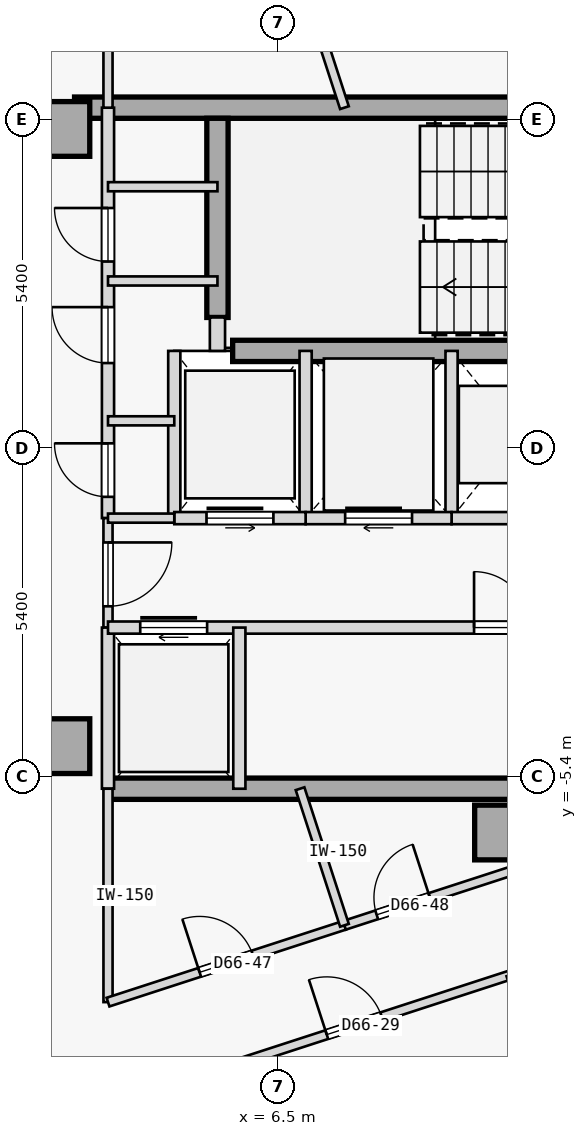
"""IFC4 building model, lengths in metres.
Left out: names, types, materials, properties, quantities, classifications, styles, units other than length and angle.
Written with IfcOpenShell. Run it as: python <this file> out.ifc"""

import sys

from ifc_helpers import new_model, si_unit, direction, frame, frame_2d, origin, origin_2d, place, context, subcontext, project, spatial, rectangle, extrude, element, fill, save


model = new_model("IFC4")
c1 = context("Model", 3, precision=1e-05, world=origin(), true_north=direction((0.0, 1.0)))
c2 = subcontext(c1, "Body", "Model", "MODEL_VIEW")
j1 = project(units=[si_unit("LENGTHUNIT", "METRE"), si_unit("PLANEANGLEUNIT", "RADIAN")], contexts=[c1])
p1 = place(None, origin())
s1 = spatial("IfcSite", under=j1, at=p1, CompositionType="ELEMENT")
p2 = place(p1, origin())
s2 = spatial("IfcBuilding", under=s1, at=p2, CompositionType="ELEMENT")
p3 = place(p2, frame((0.0, 0.0, 247.75)))
s3 = spatial("IfcBuildingStorey", under=s2, at=p3, CompositionType="ELEMENT", Elevation=247.75)
for number, where, z_axis, x_axis in (
    (1, (10.18, -6.32, 0.0), (0.0, 0.0, 1.0), (1.0, 0.0, 0.0)),
    (2, (2.95, -4.9, 0.0), (0.0, 0.0, 1.0), (1.0, 0.0, 0.0)),
    (3, (2.95, 5.25, 0.0), (0.0, 0.0, 1.0), (1.0, 0.0, 0.0)),
):
    element("IfcColumn", number, at=place(p3, frame(where, z_axis=z_axis, x_axis=x_axis)), inside=s3, PredefinedType="COLUMN", context=c2, shape_type="SweptSolid", body=[
        extrude(rectangle(XDim=0.9, YDim=0.9, at=origin_2d()), origin(), (0.0, 0.0, 1.0), 3.35),
    ])
p4 = place(p3, frame((3.15, 5.6, 0.0), z_axis=(0.0, 0.0, 1.0), x_axis=(1.0, 0.0, 0.0)))
e4 = element("IfcWall", 4, at=p4, inside=s3, PredefinedType="SHEAR", context=c2, shape_type="SweptSolid", body=[
    extrude(rectangle(XDim=11.41, YDim=0.35, at=frame_2d((5.705, 0.0))), origin(), (0.0, 0.0, 1.0), 3.125),
])
p5 = place(p3, frame((3.7, -5.6, 0.0), z_axis=(0.0, 0.0, 1.0), x_axis=(1.0, 0.0, 0.0)))
e5 = element("IfcWall", 5, at=p5, inside=s3, PredefinedType="SHEAR", context=c2, shape_type="SweptSolid", body=[
    extrude(rectangle(XDim=10.86, YDim=0.35, at=frame_2d((5.43, 0.0))), origin(), (0.0, 0.0, 1.0), 3.125),
])
p6 = place(p3, frame((5.5, 2.15, 0.0), z_axis=(0.0, 0.0, 1.0), x_axis=(0.0, 1.0, 0.0)))
e6 = element("IfcWall", 6, at=p6, inside=s3, PredefinedType="SHEAR", context=c2, shape_type="SweptSolid", body=[
    extrude(rectangle(XDim=3.275, YDim=0.35, at=frame_2d((1.638, 0.0))), origin(), (0.0, 0.0, 1.0), 3.125),
])
p7 = place(p3, frame((5.75, 1.6, 0.0), z_axis=(0.0, 0.0, 1.0), x_axis=(1.0, 0.0, 0.0)))
e7 = element("IfcWall", 7, at=p7, inside=s3, PredefinedType="SHEAR", context=c2, shape_type="SweptSolid", body=[
    extrude(rectangle(XDim=5.15, YDim=0.35, at=frame_2d((2.575, 0.0))), origin(), (0.0, 0.0, 1.0), 3.125),
])
p8 = place(p3, frame((5.5, 1.6, 0.0), z_axis=(0.0, 0.0, 1.0), x_axis=(0.0, 1.0, 0.0)))
e8 = element("IfcWall", 8, at=p8, inside=s3, PredefinedType="STANDARD", context=c2, shape_type="SweptSolid", body=[
    extrude(rectangle(XDim=0.55, YDim=0.25, at=frame_2d((0.275, 0.0))), origin(), (0.0, 0.0, 1.0), 3.125),
])
p9 = place(p3, frame((3.7, -1.15, 0.0), z_axis=(0.0, 0.0, 1.0), x_axis=(0.0, 1.0, 0.0)))
e9 = element("IfcWall", 9, at=p9, inside=s3, PredefinedType="STANDARD", context=c2, shape_type="SweptSolid", body=[
    extrude(rectangle(XDim=6.75, YDim=0.2, at=frame_2d((3.375, 0.0))), origin(), (0.0, 0.0, 1.0), 3.125),
])
p10 = place(p9, frame((0.35, 0.0, 0.0)))
e10 = element("IfcOpeningElement", 10, at=p10, cuts=e9, PredefinedType="OPENING", context=c2, shape_type="SweptSolid", body=[
    extrude(rectangle(XDim=0.88, YDim=2.15, at=frame_2d((0.44, 1.075))), frame((0.0, 0.11, 0.0), z_axis=(0.0, -1.0, 0.0), x_axis=(1.0, 0.0, 0.0)), (0.0, 0.0, 1.0), 0.22),
])
p11 = place(p9, frame((2.55, 0.0, 0.0)))
e11 = element("IfcOpeningElement", 11, at=p11, cuts=e9, PredefinedType="OPENING", context=c2, shape_type="SweptSolid", body=[
    extrude(rectangle(XDim=0.92, YDim=2.15, at=frame_2d((0.46, 1.075))), frame((0.0, 0.11, 0.0), z_axis=(0.0, -1.0, 0.0), x_axis=(1.0, 0.0, 0.0)), (0.0, 0.0, 1.0), 0.22),
])
p12 = place(p9, frame((4.22, 0.0, 0.0)))
e12 = element("IfcOpeningElement", 12, at=p12, cuts=e9, PredefinedType="OPENING", context=c2, shape_type="SweptSolid", body=[
    extrude(rectangle(XDim=0.88, YDim=2.15, at=frame_2d((0.44, 1.075))), frame((0.0, 0.11, 0.0), z_axis=(0.0, -1.0, 0.0), x_axis=(1.0, 0.0, 0.0)), (0.0, 0.0, 1.0), 0.22),
])
p13 = place(p3, frame((3.7, -2.95, 0.0), z_axis=(0.0, 0.0, 1.0), x_axis=(0.0, 1.0, 0.0)))
e13 = element("IfcWall", 13, at=p13, inside=s3, PredefinedType="PARTITIONING", context=c2, shape_type="SweptSolid", body=[
    extrude(rectangle(XDim=1.8, YDim=0.15, at=frame_2d((0.9, 0.0))), origin(), (0.0, 0.0, 1.0), 3.125),
])
p14 = place(p13, frame((0.35, 0.0, 0.0)))
e14 = element("IfcOpeningElement", 14, at=p14, cuts=e13, PredefinedType="OPENING", context=c2, shape_type="SweptSolid", body=[
    extrude(rectangle(XDim=1.05, YDim=2.18, at=frame_2d((0.525, 1.09))), frame((0.0, 0.085, 0.0), z_axis=(0.0, -1.0, 0.0), x_axis=(1.0, 0.0, 0.0)), (0.0, 0.0, 1.0), 0.17),
])
p15 = place(p3, frame((3.7, -5.6, 0.0), z_axis=(0.0, 0.0, 1.0), x_axis=(0.0, 1.0, 0.0)))
e15 = element("IfcWall", 15, at=p15, inside=s3, PredefinedType="STANDARD", context=c2, shape_type="SweptSolid", body=[
    extrude(rectangle(XDim=2.65, YDim=0.2, at=frame_2d((1.325, 0.0))), origin(), (0.0, 0.0, 1.0), 3.125),
])
p16 = place(p3, frame((9.35, -1.15, 0.0), z_axis=(0.0, 0.0, 1.0), x_axis=(0.0, 1.0, 0.0)))
e16 = element("IfcWall", 16, at=p16, inside=s3, PredefinedType="STANDARD", context=c2, shape_type="SweptSolid", body=[
    extrude(rectangle(XDim=2.75, YDim=0.2, at=frame_2d((1.375, 0.0))), origin(), (0.0, 0.0, 1.0), 3.125),
])
p17 = place(p3, frame((9.35, -1.15, 0.0), z_axis=(0.0, 0.0, 1.0), x_axis=(1.0, 0.0, 0.0)))
e17 = element("IfcWall", 17, at=p17, inside=s3, PredefinedType="STANDARD", context=c2, shape_type="SweptSolid", body=[
    extrude(rectangle(XDim=2.2, YDim=0.2, at=frame_2d((1.1, 0.0))), origin(), (0.0, 0.0, 1.0), 3.125),
])
p18 = place(p3, frame((6.95, -1.15, 0.0), z_axis=(0.0, 0.0, 1.0), x_axis=(0.0, 1.0, 0.0)))
e18 = element("IfcWall", 18, at=p18, inside=s3, PredefinedType="STANDARD", context=c2, shape_type="SweptSolid", body=[
    extrude(rectangle(XDim=2.75, YDim=0.2, at=frame_2d((1.375, 0.0))), origin(), (0.0, 0.0, 1.0), 3.125),
])
p19 = place(p3, frame((6.95, -1.15, 0.0), z_axis=(0.0, 0.0, 1.0), x_axis=(1.0, 0.0, 0.0)))
e19 = element("IfcWall", 19, at=p19, inside=s3, PredefinedType="STANDARD", context=c2, shape_type="SweptSolid", body=[
    extrude(rectangle(XDim=2.4, YDim=0.2, at=frame_2d((1.2, 0.0))), origin(), (0.0, 0.0, 1.0), 3.125),
])
p20 = place(p19, frame((0.65, 0.0, 0.0)))
e20 = element("IfcOpeningElement", 20, at=p20, cuts=e19, PredefinedType="OPENING", context=c2, shape_type="SweptSolid", body=[
    extrude(rectangle(XDim=1.1, YDim=2.15, at=frame_2d((0.55, 1.075))), frame((0.0, 0.11, 0.0), z_axis=(0.0, -1.0, 0.0), x_axis=(1.0, 0.0, 0.0)), (0.0, 0.0, 1.0), 0.22),
])
p21 = place(p3, frame((4.79, -1.15, 0.0), z_axis=(0.0, 0.0, 1.0), x_axis=(0.0, 1.0, 0.0)))
e21 = element("IfcWall", 21, at=p21, inside=s3, PredefinedType="STANDARD", context=c2, shape_type="SweptSolid", body=[
    extrude(rectangle(XDim=2.75, YDim=0.2, at=frame_2d((1.375, 0.0))), origin(), (0.0, 0.0, 1.0), 3.125),
])
p22 = place(p3, frame((4.79, -1.15, 0.0), z_axis=(0.0, 0.0, 1.0), x_axis=(1.0, 0.0, 0.0)))
e22 = element("IfcWall", 22, at=p22, inside=s3, PredefinedType="STANDARD", context=c2, shape_type="SweptSolid", body=[
    extrude(rectangle(XDim=2.16, YDim=0.2, at=frame_2d((1.08, 0.0))), origin(), (0.0, 0.0, 1.0), 3.125),
])
p23 = place(p22, frame((0.53, 0.0, 0.0)))
e23 = element("IfcOpeningElement", 23, at=p23, cuts=e22, PredefinedType="OPENING", context=c2, shape_type="SweptSolid", body=[
    extrude(rectangle(XDim=1.1, YDim=2.15, at=frame_2d((0.55, 1.075))), frame((0.0, 0.11, 0.0), z_axis=(0.0, -1.0, 0.0), x_axis=(1.0, 0.0, 0.0)), (0.0, 0.0, 1.0), 0.22),
])
p24 = place(p3, frame((3.7, -1.15, 0.0), z_axis=(0.0, 0.0, 1.0), x_axis=(1.0, 0.0, 0.0)))
e24 = element("IfcWall", 24, at=p24, inside=s3, PredefinedType="PARTITIONING", context=c2, shape_type="SweptSolid", body=[
    extrude(rectangle(XDim=1.09, YDim=0.15, at=frame_2d((0.545, 0.0))), origin(), (0.0, 0.0, 1.0), 3.125),
])
p25 = place(p3, frame((3.7, -2.95, 0.0), z_axis=(0.0, 0.0, 1.0), x_axis=(1.0, 0.0, 0.0)))
e25 = element("IfcWall", 25, at=p25, inside=s3, PredefinedType="STANDARD", context=c2, shape_type="SweptSolid", body=[
    extrude(rectangle(XDim=10.8, YDim=0.2, at=frame_2d((5.4, 0.0))), origin(), (0.0, 0.0, 1.0), 3.125),
])
p26 = place(p25, frame((0.53, 0.0, 0.0)))
e26 = element("IfcOpeningElement", 26, at=p26, cuts=e25, PredefinedType="OPENING", context=c2, shape_type="SweptSolid", body=[
    extrude(rectangle(XDim=1.1, YDim=2.15, at=frame_2d((0.55, 1.075))), frame((0.0, 0.11, 0.0), z_axis=(0.0, -1.0, 0.0), x_axis=(1.0, 0.0, 0.0)), (0.0, 0.0, 1.0), 0.22),
])
p27 = place(p25, frame((6.02, 0.0, 0.0)))
e27 = element("IfcOpeningElement", 27, at=p27, cuts=e25, PredefinedType="OPENING", context=c2, shape_type="SweptSolid", body=[
    extrude(rectangle(XDim=0.92, YDim=2.15, at=frame_2d((0.46, 1.075))), frame((0.0, 0.11, 0.0), z_axis=(0.0, -1.0, 0.0), x_axis=(1.0, 0.0, 0.0)), (0.0, 0.0, 1.0), 0.22),
])
p28 = place(p3, frame((5.86, -5.6, 0.0), z_axis=(0.0, 0.0, 1.0), x_axis=(0.0, 1.0, 0.0)))
e28 = element("IfcWall", 28, at=p28, inside=s3, PredefinedType="STANDARD", context=c2, shape_type="SweptSolid", body=[
    extrude(rectangle(XDim=2.65, YDim=0.2, at=frame_2d((1.325, 0.0))), origin(), (0.0, 0.0, 1.0), 3.125),
])
p29 = place(p3, frame((3.7, 4.3, 0.0), z_axis=(0.0, 0.0, 1.0), x_axis=(1.0, 0.0, 0.0)))
e29 = element("IfcWall", 29, at=p29, inside=s3, PredefinedType="PARTITIONING", context=c2, shape_type="SweptSolid", body=[
    extrude(rectangle(XDim=1.8, YDim=0.15, at=frame_2d((0.9, 0.0))), origin(), (0.0, 0.0, 1.0), 3.125),
])
p30 = place(p3, frame((3.7, 0.45, 0.0), z_axis=(0.0, 0.0, 1.0), x_axis=(1.0, 0.0, 0.0)))
e30 = element("IfcWall", 30, at=p30, inside=s3, PredefinedType="PARTITIONING", context=c2, shape_type="SweptSolid", body=[
    extrude(rectangle(XDim=1.09, YDim=0.15, at=frame_2d((0.545, 0.0))), origin(), (0.0, 0.0, 1.0), 3.125),
])
p31 = place(p3, frame((3.7, 2.75, 0.0), z_axis=(0.0, 0.0, 1.0), x_axis=(1.0, 0.0, 0.0)))
e31 = element("IfcWall", 31, at=p31, inside=s3, PredefinedType="PARTITIONING", context=c2, shape_type="SweptSolid", body=[
    extrude(rectangle(XDim=1.8, YDim=0.15, at=frame_2d((0.9, 0.0))), origin(), (0.0, 0.0, 1.0), 3.125),
])
p32 = place(p3, frame((5.174, -10.334, 0.0), z_axis=(0.0, 0.0, 1.0), x_axis=(0.951058579685, 0.30901064384, 0.0)))
e32 = element("IfcWall", 32, at=p32, inside=s3, PredefinedType="PARTITIONING", context=c2, shape_type="SweptSolid", body=[
    extrude(rectangle(XDim=5.416, YDim=0.15, at=frame_2d((2.708, 0.0))), origin(), (0.0, 0.0, 1.0), 3.125),
])
p33 = place(p32, frame((2.233, 0.0, 0.0)))
e33 = element("IfcOpeningElement", 33, at=p33, cuts=e32, PredefinedType="OPENING", context=c2, shape_type="SweptSolid", body=[
    extrude(rectangle(XDim=0.95, YDim=2.15, at=frame_2d((0.475, 1.075))), frame((0.0, 0.085, 0.0), z_axis=(0.0, -1.0, 0.0), x_axis=(1.0, 0.0, 0.0)), (0.0, 0.0, 1.0), 0.17),
])
p34 = place(p3, frame((3.7, -9.109, 0.0), z_axis=(0.0, 0.0, 1.0), x_axis=(-0.000139130433, 0.999999990321, 0.0)))
e34 = element("IfcWall", 34, at=p34, inside=s3, PredefinedType="PARTITIONING", context=c2, shape_type="SweptSolid", body=[
    extrude(rectangle(XDim=3.51, YDim=0.15, at=frame_2d((1.755, 0.0))), origin(), (0.0, 0.0, 1.0), 3.125),
])
p35 = place(p3, frame((3.7, -9.109, 0.0), z_axis=(0.0, 0.0, 1.0), x_axis=(0.95106259184, 0.308998295145, 0.0)))
e35 = element("IfcWall", 35, at=p35, inside=s3, PredefinedType="PARTITIONING", context=c2, shape_type="SweptSolid", body=[
    extrude(rectangle(XDim=4.088, YDim=0.15, at=frame_2d((2.044, 0.0))), origin(), (0.0, 0.0, 1.0), 3.125),
])
p36 = place(p35, frame((1.584, 0.0, 0.0)))
e36 = element("IfcOpeningElement", 36, at=p36, cuts=e35, PredefinedType="OPENING", context=c2, shape_type="SweptSolid", body=[
    extrude(rectangle(XDim=0.92, YDim=2.15, at=frame_2d((0.46, 1.075))), frame((0.0, 0.085, 0.0), z_axis=(0.0, -1.0, 0.0), x_axis=(1.0, 0.0, 0.0)), (0.0, 0.0, 1.0), 0.17),
])
p37 = place(p3, frame((7.588, -7.846, 0.0), z_axis=(0.0, 0.0, 1.0), x_axis=(0.951058013903, 0.309012385174, 0.0)))
e37 = element("IfcWall", 37, at=p37, inside=s3, PredefinedType="PARTITIONING", context=c2, shape_type="SweptSolid", body=[
    extrude(rectangle(XDim=7.267, YDim=0.15, at=frame_2d((3.634, 0.0))), origin(), (0.0, 0.0, 1.0), 3.125),
])
p38 = place(p37, frame((0.557, 0.0, 0.0)))
e38 = element("IfcOpeningElement", 38, at=p38, cuts=e37, PredefinedType="OPENING", context=c2, shape_type="SweptSolid", body=[
    extrude(rectangle(XDim=0.92, YDim=2.15, at=frame_2d((0.46, 1.075))), frame((0.0, 0.085, 0.0), z_axis=(0.0, -1.0, 0.0), x_axis=(1.0, 0.0, 0.0)), (0.0, 0.0, 1.0), 0.17),
])
p39 = place(p3, frame((3.7, 5.6, 0.0), z_axis=(0.0, 0.0, 1.0), x_axis=(-0.000123839008, 0.999999992332, 0.0)))
e39 = element("IfcWall", 39, at=p39, inside=s3, PredefinedType="PARTITIONING", context=c2, shape_type="SweptSolid", body=[
    extrude(rectangle(XDim=5.914, YDim=0.15, at=frame_2d((2.957, 0.0))), origin(), (0.0, 0.0, 1.0), 2.675),
])
p40 = place(p39, frame((2.497, 0.0, 0.0)))
e40 = element("IfcOpeningElement", 40, at=p40, cuts=e39, PredefinedType="OPENING", context=c2, shape_type="SweptSolid", body=[
    extrude(rectangle(XDim=0.92, YDim=2.15, at=frame_2d((0.46, 1.075))), frame((0.0, 0.085, 0.0), z_axis=(0.0, -1.0, 0.0), x_axis=(1.0, 0.0, 0.0)), (0.0, 0.0, 1.0), 0.17),
])
p41 = place(p3, frame((13.372, -18.04, 0.0), z_axis=(0.0, 0.0, 1.0), x_axis=(-0.308999867152, 0.951062081097, 0.0)))
e41 = element("IfcWall", 41, at=p41, inside=s3, PredefinedType="PARTITIONING", context=c2, shape_type="SweptSolid", body=[
    extrude(rectangle(XDim=9.862, YDim=0.15, at=frame_2d((4.931, 0.0))), origin(), (0.0, 0.0, 1.0), 3.125),
])
p42 = place(p3, frame((7.588, -7.846, 0.0), z_axis=(0.0, 0.0, 1.0), x_axis=(-0.309055688452, 0.951043942957, 0.0)))
e42 = element("IfcWall", 42, at=p42, inside=s3, PredefinedType="PARTITIONING", context=c2, shape_type="SweptSolid", body=[
    extrude(rectangle(XDim=2.362, YDim=0.15, at=frame_2d((1.181, 0.0))), origin(), (0.0, 0.0, 1.0), 3.125),
])
p43 = place(p3, frame((7.588, 5.6, 0.0), z_axis=(0.0, 0.0, 1.0), x_axis=(-0.309018946982, 0.951055881852, 0.0)))
e43 = element("IfcWall", 43, at=p43, inside=s3, PredefinedType="PARTITIONING", context=c2, shape_type="SweptSolid", body=[
    extrude(rectangle(XDim=6.826, YDim=0.15, at=frame_2d((3.413, 0.0))), origin(), (0.0, 0.0, 1.0), 3.125),
])
p44 = place(p14, frame((1.05, 0.0, 0.0), z_axis=(0.0, 0.0, 1.0), x_axis=(-1.0, 0.0, 0.0)))
e44 = element("IfcDoor", 44, at=p44, inside=s3, OperationType="SINGLE_SWING_RIGHT", PredefinedType="DOOR", context=c2, shape_type="SweptSolid", body=[
    extrude(rectangle(XDim=1.05, YDim=2.18, at=frame_2d((0.525, 1.09))), frame((0.0, 0.025, 0.0), z_axis=(0.0, -1.0, 0.0), x_axis=(1.0, 0.0, 0.0)), (0.0, 0.0, 1.0), 0.05),
])
fill(e14, e44)
p45 = place(p20, origin())
e45 = element("IfcDoor", 45, at=p45, inside=s3, OperationType="SLIDING_TO_RIGHT", PredefinedType="DOOR", context=c2, shape_type="SweptSolid", body=[
    extrude(rectangle(XDim=1.1, YDim=2.15, at=frame_2d((0.55, 1.075))), frame((0.0, 0.025, 0.0), z_axis=(0.0, -1.0, 0.0), x_axis=(1.0, 0.0, 0.0)), (0.0, 0.0, 1.0), 0.05),
])
fill(e20, e45)
p46 = place(p23, origin())
e46 = element("IfcDoor", 46, at=p46, inside=s3, OperationType="SLIDING_TO_LEFT", PredefinedType="DOOR", context=c2, shape_type="SweptSolid", body=[
    extrude(rectangle(XDim=1.1, YDim=2.15, at=frame_2d((0.55, 1.075))), frame((0.0, 0.025, 0.0), z_axis=(0.0, -1.0, 0.0), x_axis=(1.0, 0.0, 0.0)), (0.0, 0.0, 1.0), 0.05),
])
fill(e23, e46)
p47 = place(p26, origin())
e47 = element("IfcDoor", 47, at=p47, inside=s3, OperationType="SLIDING_TO_RIGHT", PredefinedType="DOOR", context=c2, shape_type="SweptSolid", body=[
    extrude(rectangle(XDim=1.1, YDim=2.15, at=frame_2d((0.55, 1.075))), frame((0.0, 0.025, 0.0), z_axis=(0.0, -1.0, 0.0), x_axis=(1.0, 0.0, 0.0)), (0.0, 0.0, 1.0), 0.05),
])
fill(e26, e47)
p48 = place(p27, origin())
e48 = element("IfcDoor", 48, at=p48, inside=s3, OperationType="SINGLE_SWING_LEFT", PredefinedType="DOOR", context=c2, shape_type="SweptSolid", body=[
    extrude(rectangle(XDim=0.92, YDim=2.15, at=frame_2d((0.46, 1.075))), frame((0.0, 0.025, 0.0), z_axis=(0.0, -1.0, 0.0), x_axis=(1.0, 0.0, 0.0)), (0.0, 0.0, 1.0), 0.05),
])
fill(e27, e48)
p49 = place(p10, origin())
e49 = element("IfcDoor", 49, at=p49, inside=s3, OperationType="SINGLE_SWING_RIGHT", PredefinedType="DOOR", context=c2, shape_type="SweptSolid", body=[
    extrude(rectangle(XDim=0.88, YDim=2.15, at=frame_2d((0.44, 1.075))), frame((0.0, 0.025, 0.0), z_axis=(0.0, -1.0, 0.0), x_axis=(1.0, 0.0, 0.0)), (0.0, 0.0, 1.0), 0.05),
])
fill(e10, e49)
p50 = place(p11, origin())
e50 = element("IfcDoor", 50, at=p50, inside=s3, OperationType="SINGLE_SWING_RIGHT", PredefinedType="DOOR", context=c2, shape_type="SweptSolid", body=[
    extrude(rectangle(XDim=0.92, YDim=2.15, at=frame_2d((0.46, 1.075))), frame((0.0, 0.025, 0.0), z_axis=(0.0, -1.0, 0.0), x_axis=(1.0, 0.0, 0.0)), (0.0, 0.0, 1.0), 0.05),
])
fill(e11, e50)
p51 = place(p12, origin())
e51 = element("IfcDoor", 51, at=p51, inside=s3, OperationType="SINGLE_SWING_RIGHT", PredefinedType="DOOR", context=c2, shape_type="SweptSolid", body=[
    extrude(rectangle(XDim=0.88, YDim=2.15, at=frame_2d((0.44, 1.075))), frame((0.0, 0.025, 0.0), z_axis=(0.0, -1.0, 0.0), x_axis=(1.0, 0.0, 0.0)), (0.0, 0.0, 1.0), 0.05),
])
fill(e12, e51)
p52 = place(p33, origin())
e52 = element("IfcDoor", 52, at=p52, inside=s3, OperationType="SINGLE_SWING_LEFT", PredefinedType="DOOR", context=c2, shape_type="SweptSolid", body=[
    extrude(rectangle(XDim=0.95, YDim=2.15, at=frame_2d((0.475, 1.075))), frame((0.0, 0.025, 0.0), z_axis=(0.0, -1.0, 0.0), x_axis=(1.0, 0.0, 0.0)), (0.0, 0.0, 1.0), 0.05),
])
fill(e33, e52)
p53 = place(p36, origin())
e53 = element("IfcDoor", 53, at=p53, inside=s3, OperationType="SINGLE_SWING_LEFT", PredefinedType="DOOR", context=c2, shape_type="SweptSolid", body=[
    extrude(rectangle(XDim=0.92, YDim=2.15, at=frame_2d((0.46, 1.075))), frame((0.0, 0.025, 0.0), z_axis=(0.0, -1.0, 0.0), x_axis=(1.0, 0.0, 0.0)), (0.0, 0.0, 1.0), 0.05),
])
fill(e36, e53)
p54 = place(p38, origin())
e54 = element("IfcDoor", 54, at=p54, inside=s3, OperationType="SINGLE_SWING_RIGHT", PredefinedType="DOOR", context=c2, shape_type="SweptSolid", body=[
    extrude(rectangle(XDim=0.92, YDim=2.15, at=frame_2d((0.46, 1.075))), frame((0.0, 0.025, 0.0), z_axis=(0.0, -1.0, 0.0), x_axis=(1.0, 0.0, 0.0)), (0.0, 0.0, 1.0), 0.05),
])
fill(e38, e54)
save(model, sys.argv[1])
